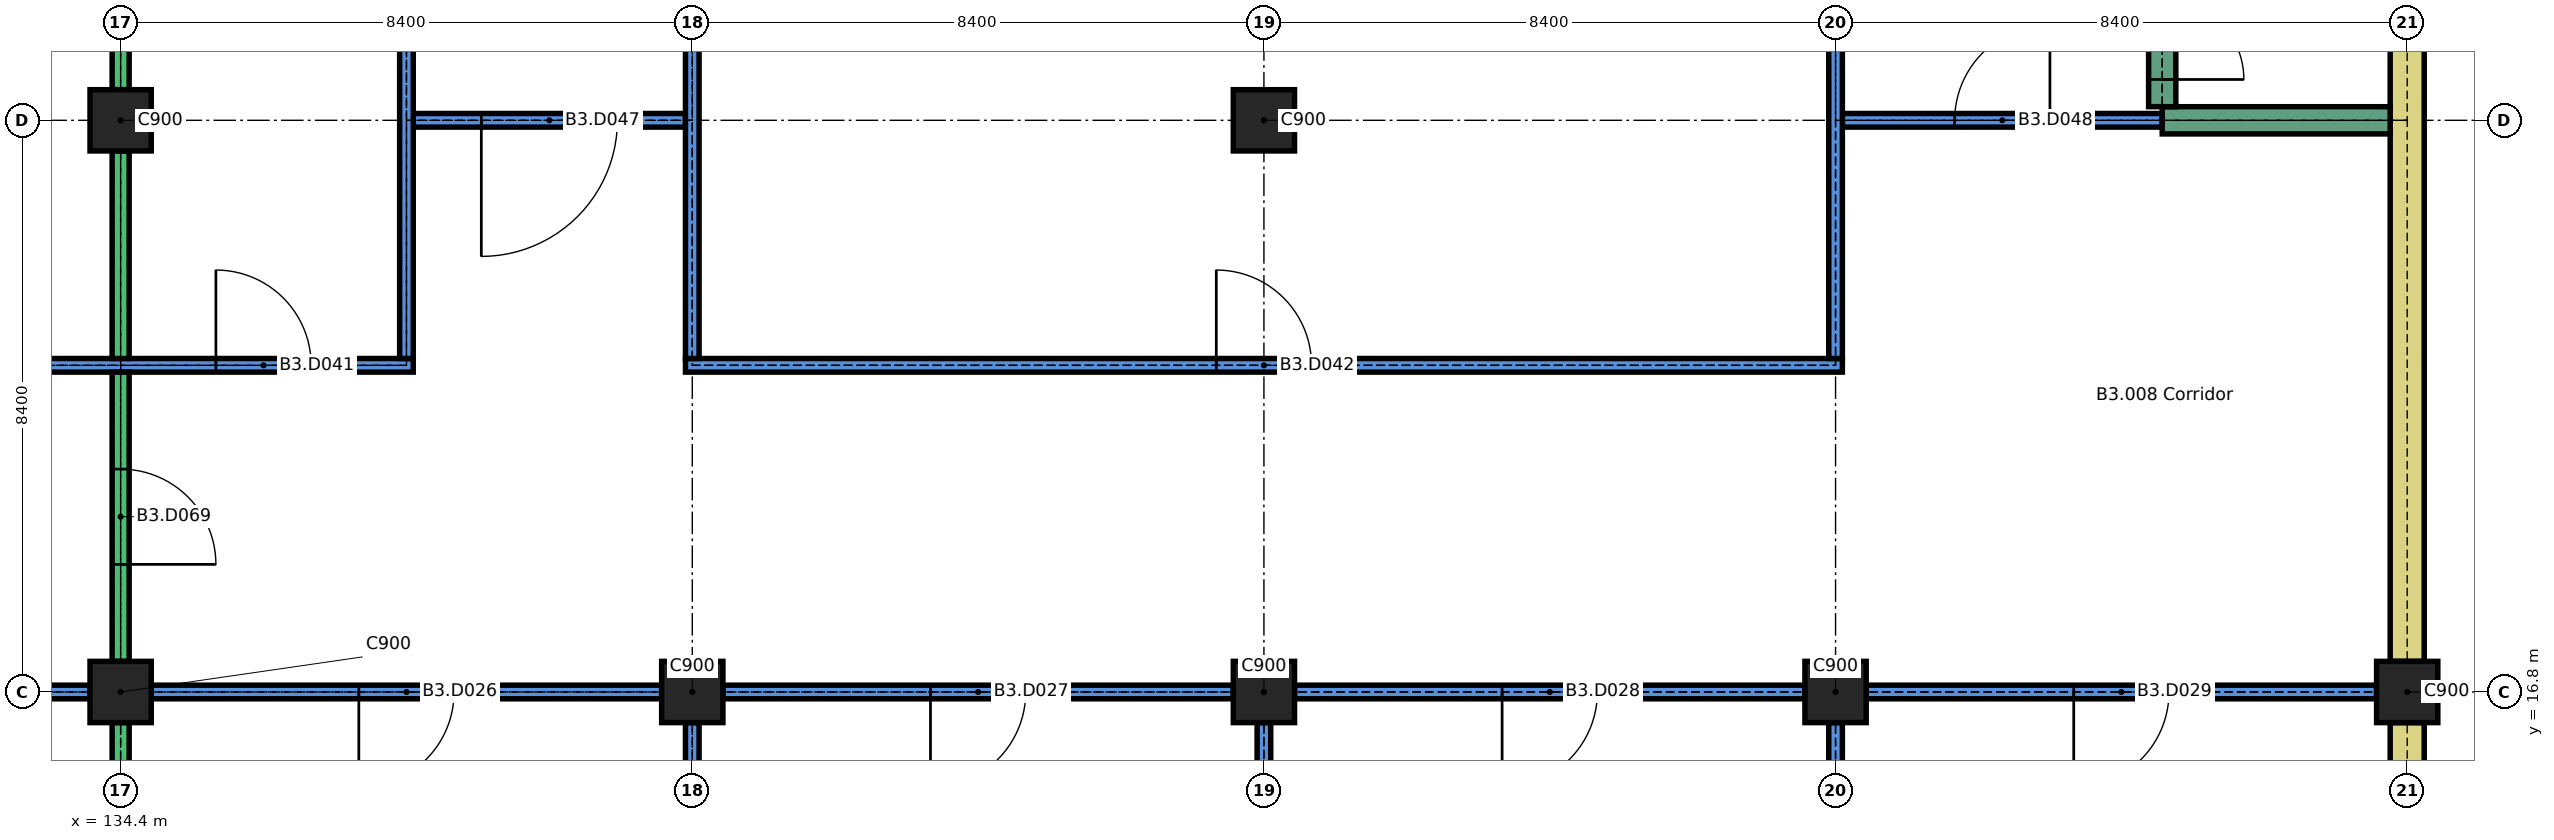
"""IFC4 building model, lengths in metres.
Left out: names, types, materials, properties, quantities, classifications, styles, units other than length and angle.
Written with IfcOpenShell. Run it as: python <this file> out.ifc"""

import sys

from ifc_helpers import new_model, si_unit, direction, frame, frame_2d, origin, origin_2d, place, context, subcontext, project, spatial, rectangle, extrude, element, fill, save


model = new_model("IFC4")
c1 = context("Model", 3, precision=1e-05, world=origin(), true_north=direction((0.0, 1.0)))
c2 = subcontext(c1, "Body", "Model", "MODEL_VIEW")
j1 = project(units=[si_unit("LENGTHUNIT", "METRE"), si_unit("PLANEANGLEUNIT", "RADIAN")], contexts=[c1])
p1 = place(None, origin())
s1 = spatial("IfcSite", under=j1, at=p1, CompositionType="ELEMENT")
p2 = place(p1, origin())
s2 = spatial("IfcBuilding", under=s1, at=p2, CompositionType="ELEMENT")
p3 = place(p2, frame((0.0, 0.0, -11.4)))
s3 = spatial("IfcBuildingStorey", under=s2, at=p3, CompositionType="ELEMENT", Elevation=-11.4)
for number, where, z_axis, x_axis in (
    (1, (134.4, 16.8, 0.0), (0.0, 0.0, 1.0), (1.0, 0.0, 0.0)),
    (2, (142.8, 16.8, 0.0), (0.0, 0.0, 1.0), (1.0, 0.0, 0.0)),
    (3, (151.2, 16.8, 0.0), (0.0, 0.0, 1.0), (1.0, 0.0, 0.0)),
    (4, (159.6, 16.8, 0.0), (0.0, 0.0, 1.0), (1.0, 0.0, 0.0)),
    (5, (168.0, 16.8, 0.0), (0.0, 0.0, 1.0), (1.0, 0.0, 0.0)),
    (6, (134.4, 25.2, 0.0), (0.0, 0.0, 1.0), (1.0, 0.0, 0.0)),
    (7, (151.2, 25.2, 0.0), (0.0, 0.0, 1.0), (1.0, 0.0, 0.0)),
):
    element("IfcColumn", number, at=place(p3, frame(where, z_axis=z_axis, x_axis=x_axis)), inside=s3, PredefinedType="COLUMN", context=c2, shape_type="SweptSolid", body=[
        extrude(rectangle(XDim=0.9, YDim=0.9, at=origin_2d()), origin(), (0.0, 0.0, 1.0), 3.2),
    ])
p4 = place(p3, frame((168.0, 8.85, 0.0), z_axis=(0.0, 0.0, 1.0), x_axis=(0.0, 1.0, 0.0)))
e8 = element("IfcWall", 8, at=p4, inside=s3, PredefinedType="SOLIDWALL", context=c2, shape_type="SweptSolid", body=[
    extrude(rectangle(XDim=7.5, YDim=0.5, at=frame_2d((3.75, 0.0))), origin(), (0.0, 0.0, 1.0), 3.2),
])
p5 = place(p3, frame((168.0, 17.25, 0.0), z_axis=(0.0, 0.0, 1.0), x_axis=(0.0, 1.0, 0.0)))
e9 = element("IfcWall", 9, at=p5, inside=s3, PredefinedType="SOLIDWALL", context=c2, shape_type="SweptSolid", body=[
    extrude(rectangle(XDim=16.6, YDim=0.5, at=frame_2d((8.3, 0.0))), origin(), (0.0, 0.0, 1.0), 3.2),
])
p6 = place(p3, frame((109.65, 16.8, 0.0), z_axis=(0.0, 0.0, 1.0), x_axis=(1.0, 0.0, 0.0)))
e10 = element("IfcWall", 10, at=p6, inside=s3, PredefinedType="PARTITIONING", context=c2, shape_type="SweptSolid", body=[
    extrude(rectangle(XDim=24.3, YDim=0.2, at=frame_2d((12.15, 0.0))), origin(), (0.0, 0.0, 1.0), 3.2),
])
p7 = place(p6, frame((3.275, 0.0, 0.0)))
e11 = element("IfcOpeningElement", 11, at=p7, cuts=e10, PredefinedType="OPENING", context=c2, shape_type="SweptSolid", body=[
    extrude(rectangle(XDim=1.4, YDim=2.1, at=frame_2d((0.7, 1.05))), frame((0.0, 0.11, 0.0), z_axis=(0.0, -1.0, 0.0), x_axis=(1.0, 0.0, 0.0)), (0.0, 0.0, 1.0), 0.22),
])
p8 = place(p6, frame((19.625, 0.0, 0.0)))
e12 = element("IfcOpeningElement", 12, at=p8, cuts=e10, PredefinedType="OPENING", context=c2, shape_type="SweptSolid", body=[
    extrude(rectangle(XDim=1.4, YDim=2.1, at=frame_2d((0.7, 1.05))), frame((0.0, 0.11, 0.0), z_axis=(0.0, -1.0, 0.0), x_axis=(1.0, 0.0, 0.0)), (0.0, 0.0, 1.0), 0.22),
])
p9 = place(p3, frame((134.85, 16.8, 0.0), z_axis=(0.0, 0.0, 1.0), x_axis=(1.0, 0.0, 0.0)))
e13 = element("IfcWall", 13, at=p9, inside=s3, PredefinedType="PARTITIONING", context=c2, shape_type="SweptSolid", body=[
    extrude(rectangle(XDim=7.5, YDim=0.2, at=frame_2d((3.75, 0.0))), origin(), (0.0, 0.0, 1.0), 3.2),
])
p10 = place(p9, frame((3.05, 0.0, 0.0)))
e14 = element("IfcOpeningElement", 14, at=p10, cuts=e13, PredefinedType="OPENING", context=c2, shape_type="SweptSolid", body=[
    extrude(rectangle(XDim=1.4, YDim=2.1, at=frame_2d((0.7, 1.05))), frame((0.0, 0.11, 0.0), z_axis=(0.0, -1.0, 0.0), x_axis=(1.0, 0.0, 0.0)), (0.0, 0.0, 1.0), 0.22),
])
p11 = place(p3, frame((143.25, 16.8, 0.0), z_axis=(0.0, 0.0, 1.0), x_axis=(1.0, 0.0, 0.0)))
e15 = element("IfcWall", 15, at=p11, inside=s3, PredefinedType="PARTITIONING", context=c2, shape_type="SweptSolid", body=[
    extrude(rectangle(XDim=7.5, YDim=0.2, at=frame_2d((3.75, 0.0))), origin(), (0.0, 0.0, 1.0), 3.2),
])
p12 = place(p11, frame((3.05, 0.0, 0.0)))
e16 = element("IfcOpeningElement", 16, at=p12, cuts=e15, PredefinedType="OPENING", context=c2, shape_type="SweptSolid", body=[
    extrude(rectangle(XDim=1.4, YDim=2.1, at=frame_2d((0.7, 1.05))), frame((0.0, 0.11, 0.0), z_axis=(0.0, -1.0, 0.0), x_axis=(1.0, 0.0, 0.0)), (0.0, 0.0, 1.0), 0.22),
])
p13 = place(p3, frame((151.65, 16.8, 0.0), z_axis=(0.0, 0.0, 1.0), x_axis=(1.0, 0.0, 0.0)))
e17 = element("IfcWall", 17, at=p13, inside=s3, PredefinedType="PARTITIONING", context=c2, shape_type="SweptSolid", body=[
    extrude(rectangle(XDim=7.5, YDim=0.2, at=frame_2d((3.75, 0.0))), origin(), (0.0, 0.0, 1.0), 3.2),
])
p14 = place(p13, frame((3.05, 0.0, 0.0)))
e18 = element("IfcOpeningElement", 18, at=p14, cuts=e17, PredefinedType="OPENING", context=c2, shape_type="SweptSolid", body=[
    extrude(rectangle(XDim=1.4, YDim=2.1, at=frame_2d((0.7, 1.05))), frame((0.0, 0.11, 0.0), z_axis=(0.0, -1.0, 0.0), x_axis=(1.0, 0.0, 0.0)), (0.0, 0.0, 1.0), 0.22),
])
p15 = place(p3, frame((160.05, 16.8, 0.0), z_axis=(0.0, 0.0, 1.0), x_axis=(1.0, 0.0, 0.0)))
e19 = element("IfcWall", 19, at=p15, inside=s3, PredefinedType="PARTITIONING", context=c2, shape_type="SweptSolid", body=[
    extrude(rectangle(XDim=7.5, YDim=0.2, at=frame_2d((3.75, 0.0))), origin(), (0.0, 0.0, 1.0), 3.2),
])
p16 = place(p15, frame((3.05, 0.0, 0.0)))
e20 = element("IfcOpeningElement", 20, at=p16, cuts=e19, PredefinedType="OPENING", context=c2, shape_type="SweptSolid", body=[
    extrude(rectangle(XDim=1.4, YDim=2.1, at=frame_2d((0.7, 1.05))), frame((0.0, 0.11, 0.0), z_axis=(0.0, -1.0, 0.0), x_axis=(1.0, 0.0, 0.0)), (0.0, 0.0, 1.0), 0.22),
])
p17 = place(p3, frame((126.0, 21.6, 0.0), z_axis=(0.0, 0.0, 1.0), x_axis=(1.0, 0.0, 0.0)))
e21 = element("IfcWall", 21, at=p17, inside=s3, PredefinedType="PARTITIONING", context=c2, shape_type="SweptSolid", body=[
    extrude(rectangle(XDim=12.7, YDim=0.2, at=frame_2d((6.35, 0.0))), origin(), (0.0, 0.0, 1.0), 3.2),
])
p18 = place(p17, frame((3.5, 0.0, 0.0)))
e22 = element("IfcOpeningElement", 22, at=p18, cuts=e21, PredefinedType="OPENING", context=c2, shape_type="SweptSolid", body=[
    extrude(rectangle(XDim=1.4, YDim=2.1, at=frame_2d((0.7, 1.05))), frame((0.0, 0.11, 0.0), z_axis=(0.0, -1.0, 0.0), x_axis=(1.0, 0.0, 0.0)), (0.0, 0.0, 1.0), 0.22),
])
p19 = place(p17, frame((9.8, 0.0, 0.0)))
e23 = element("IfcOpeningElement", 23, at=p19, cuts=e21, PredefinedType="OPENING", context=c2, shape_type="SweptSolid", body=[
    extrude(rectangle(XDim=1.4, YDim=2.1, at=frame_2d((0.7, 1.05))), frame((0.0, 0.11, 0.0), z_axis=(0.0, -1.0, 0.0), x_axis=(1.0, 0.0, 0.0)), (0.0, 0.0, 1.0), 0.22),
])
p20 = place(p3, frame((142.7, 21.6, 0.0), z_axis=(0.0, 0.0, 1.0), x_axis=(1.0, 0.0, 0.0)))
e24 = element("IfcWall", 24, at=p20, inside=s3, PredefinedType="PARTITIONING", context=c2, shape_type="SweptSolid", body=[
    extrude(rectangle(XDim=17.0, YDim=0.2, at=frame_2d((8.5, 0.0))), origin(), (0.0, 0.0, 1.0), 3.2),
])
p21 = place(p20, frame((7.8, 0.0, 0.0)))
e25 = element("IfcOpeningElement", 25, at=p21, cuts=e24, PredefinedType="OPENING", context=c2, shape_type="SweptSolid", body=[
    extrude(rectangle(XDim=1.4, YDim=2.1, at=frame_2d((0.7, 1.05))), frame((0.0, 0.11, 0.0), z_axis=(0.0, -1.0, 0.0), x_axis=(1.0, 0.0, 0.0)), (0.0, 0.0, 1.0), 0.22),
])
p22 = place(p3, frame((138.7, 25.2, 0.0), z_axis=(0.0, 0.0, 1.0), x_axis=(1.0, 0.0, 0.0)))
e26 = element("IfcWall", 26, at=p22, inside=s3, PredefinedType="PARTITIONING", context=c2, shape_type="SweptSolid", body=[
    extrude(rectangle(XDim=4.0, YDim=0.2, at=frame_2d((2.0, 0.0))), origin(), (0.0, 0.0, 1.0), 3.2),
])
p23 = place(p22, frame((1.0, 0.0, 0.0)))
e27 = element("IfcOpeningElement", 27, at=p23, cuts=e26, PredefinedType="OPENING", context=c2, shape_type="SweptSolid", body=[
    extrude(rectangle(XDim=2.0, YDim=2.4, at=frame_2d((1.0, 1.2))), frame((0.0, 0.11, 0.0), z_axis=(0.0, -1.0, 0.0), x_axis=(1.0, 0.0, 0.0)), (0.0, 0.0, 1.0), 0.22),
])
p24 = place(p3, frame((159.7, 25.2, 0.0), z_axis=(0.0, 0.0, 1.0), x_axis=(1.0, 0.0, 0.0)))
e28 = element("IfcWall", 28, at=p24, inside=s3, PredefinedType="PARTITIONING", context=c2, shape_type="SweptSolid", body=[
    extrude(rectangle(XDim=4.7, YDim=0.2, at=frame_2d((2.35, 0.0))), origin(), (0.0, 0.0, 1.0), 3.2),
])
p25 = place(p24, frame((1.65, 0.0, 0.0)))
e29 = element("IfcOpeningElement", 29, at=p25, cuts=e28, PredefinedType="OPENING", context=c2, shape_type="SweptSolid", body=[
    extrude(rectangle(XDim=1.4, YDim=2.1, at=frame_2d((0.7, 1.05))), frame((0.0, 0.11, 0.0), z_axis=(0.0, -1.0, 0.0), x_axis=(1.0, 0.0, 0.0)), (0.0, 0.0, 1.0), 0.22),
])
p26 = place(p3, frame((164.4, 25.2, 0.0), z_axis=(0.0, 0.0, 1.0), x_axis=(1.0, 0.0, 0.0)))
e30 = element("IfcWall", 30, at=p26, inside=s3, PredefinedType="SHEAR", context=c2, shape_type="SweptSolid", body=[
    extrude(rectangle(XDim=3.35, YDim=0.4, at=frame_2d((1.675, 0.0))), origin(), (0.0, 0.0, 1.0), 3.2),
])
p27 = place(p3, frame((134.4, 8.85, 0.0), z_axis=(0.0, 0.0, 1.0), x_axis=(0.0, 1.0, 0.0)))
e31 = element("IfcWall", 31, at=p27, inside=s3, PredefinedType="SOLIDWALL", context=c2, shape_type="SweptSolid", body=[
    extrude(rectangle(XDim=7.5, YDim=0.25, at=frame_2d((3.75, 0.0))), origin(), (0.0, 0.0, 1.0), 3.2),
])
p28 = place(p3, frame((134.4, 17.25, 0.0), z_axis=(0.0, 0.0, 1.0), x_axis=(0.0, 1.0, 0.0)))
e32 = element("IfcWall", 32, at=p28, inside=s3, PredefinedType="SOLIDWALL", context=c2, shape_type="SweptSolid", body=[
    extrude(rectangle(XDim=4.25, YDim=0.25, at=frame_2d((2.125, 0.0))), origin(), (0.0, 0.0, 1.0), 3.2),
])
p29 = place(p28, frame((1.425, 0.0, 0.0)))
e33 = element("IfcOpeningElement", 33, at=p29, cuts=e32, PredefinedType="OPENING", context=c2, shape_type="SweptSolid", body=[
    extrude(rectangle(XDim=1.4, YDim=2.1, at=frame_2d((0.7, 1.05))), frame((0.0, 0.135, 0.0), z_axis=(0.0, -1.0, 0.0), x_axis=(1.0, 0.0, 0.0)), (0.0, 0.0, 1.0), 0.27),
])
p30 = place(p3, frame((134.4, 21.7, 0.0), z_axis=(0.0, 0.0, 1.0), x_axis=(0.0, 1.0, 0.0)))
e34 = element("IfcWall", 34, at=p30, inside=s3, PredefinedType="SOLIDWALL", context=c2, shape_type="SweptSolid", body=[
    extrude(rectangle(XDim=3.05, YDim=0.25, at=frame_2d((1.525, 0.0))), origin(), (0.0, 0.0, 1.0), 3.2),
])
p31 = place(p3, frame((134.4, 25.65, 0.0), z_axis=(0.0, 0.0, 1.0), x_axis=(0.0, 1.0, 0.0)))
e35 = element("IfcWall", 35, at=p31, inside=s3, PredefinedType="SOLIDWALL", context=c2, shape_type="SweptSolid", body=[
    extrude(rectangle(XDim=7.5, YDim=0.25, at=frame_2d((3.75, 0.0))), origin(), (0.0, 0.0, 1.0), 3.2),
])
p32 = place(p3, frame((138.6, 21.7, 0.0), z_axis=(0.0, 0.0, 1.0), x_axis=(0.0, 1.0, 0.0)))
e36 = element("IfcWall", 36, at=p32, inside=s3, PredefinedType="PARTITIONING", context=c2, shape_type="SweptSolid", body=[
    extrude(rectangle(XDim=8.3, YDim=0.2, at=frame_2d((4.15, 0.0))), origin(), (0.0, 0.0, 1.0), 3.2),
])
p33 = place(p3, frame((142.8, 8.85, 0.0), z_axis=(0.0, 0.0, 1.0), x_axis=(0.0, 1.0, 0.0)))
e37 = element("IfcWall", 37, at=p33, inside=s3, PredefinedType="PARTITIONING", context=c2, shape_type="SweptSolid", body=[
    extrude(rectangle(XDim=7.5, YDim=0.2, at=frame_2d((3.75, 0.0))), origin(), (0.0, 0.0, 1.0), 3.2),
])
p34 = place(p3, frame((142.8, 21.7, 0.0), z_axis=(0.0, 0.0, 1.0), x_axis=(0.0, 1.0, 0.0)))
e38 = element("IfcWall", 38, at=p34, inside=s3, PredefinedType="PARTITIONING", context=c2, shape_type="SweptSolid", body=[
    extrude(rectangle(XDim=8.3, YDim=0.2, at=frame_2d((4.15, 0.0))), origin(), (0.0, 0.0, 1.0), 3.2),
])
for number, where, z_axis, x_axis in (
    (39, (151.2, 8.85, 0.0), (0.0, 0.0, 1.0), (0.0, 1.0, 0.0)),
    (40, (159.6, 8.85, 0.0), (0.0, 0.0, 1.0), (0.0, 1.0, 0.0)),
):
    element("IfcWall", number, at=place(p3, frame(where, z_axis=z_axis, x_axis=x_axis)), inside=s3, PredefinedType="PARTITIONING", context=c2, shape_type="SweptSolid", body=[
        extrude(rectangle(XDim=7.5, YDim=0.2, at=frame_2d((3.75, 0.0))), origin(), (0.0, 0.0, 1.0), 3.2),
    ])
p35 = place(p3, frame((159.6, 21.7, 0.0), z_axis=(0.0, 0.0, 1.0), x_axis=(0.0, 1.0, 0.0)))
e41 = element("IfcWall", 41, at=p35, inside=s3, PredefinedType="PARTITIONING", context=c2, shape_type="SweptSolid", body=[
    extrude(rectangle(XDim=11.65, YDim=0.2, at=frame_2d((5.825, 0.0))), origin(), (0.0, 0.0, 1.0), 3.2),
])
p36 = place(p3, frame((164.4, 25.4, 0.0), z_axis=(0.0, 0.0, 1.0), x_axis=(0.0, 1.0, 0.0)))
e42 = element("IfcWall", 42, at=p36, inside=s3, PredefinedType="SHEAR", context=c2, shape_type="SweptSolid", body=[
    extrude(rectangle(XDim=7.95, YDim=0.4, at=frame_2d((3.975, 0.0))), origin(), (0.0, 0.0, 1.0), 3.2),
])
p37 = place(p36, frame((0.4, 0.0, 0.0)))
e43 = element("IfcOpeningElement", 43, at=p37, cuts=e42, PredefinedType="OPENING", context=c2, shape_type="SweptSolid", body=[
    extrude(rectangle(XDim=1.2, YDim=2.1, at=frame_2d((0.6, 1.05))), frame((0.0, 0.21, 0.0), z_axis=(0.0, -1.0, 0.0), x_axis=(1.0, 0.0, 0.0)), (0.0, 0.0, 1.0), 0.42),
])
p38 = place(p10, origin())
e44 = element("IfcDoor", 44, at=p38, inside=s3, OperationType="SINGLE_SWING_LEFT", PredefinedType="DOOR", context=c2, shape_type="SweptSolid", body=[
    extrude(rectangle(XDim=1.4, YDim=2.1, at=frame_2d((0.7, 1.05))), frame((0.0, 0.025, 0.0), z_axis=(0.0, -1.0, 0.0), x_axis=(1.0, 0.0, 0.0)), (0.0, 0.0, 1.0), 0.05),
])
fill(e14, e44)
p39 = place(p12, origin())
e45 = element("IfcDoor", 45, at=p39, inside=s3, OperationType="SINGLE_SWING_LEFT", PredefinedType="DOOR", context=c2, shape_type="SweptSolid", body=[
    extrude(rectangle(XDim=1.4, YDim=2.1, at=frame_2d((0.7, 1.05))), frame((0.0, 0.025, 0.0), z_axis=(0.0, -1.0, 0.0), x_axis=(1.0, 0.0, 0.0)), (0.0, 0.0, 1.0), 0.05),
])
fill(e16, e45)
p40 = place(p14, origin())
e46 = element("IfcDoor", 46, at=p40, inside=s3, OperationType="SINGLE_SWING_LEFT", PredefinedType="DOOR", context=c2, shape_type="SweptSolid", body=[
    extrude(rectangle(XDim=1.4, YDim=2.1, at=frame_2d((0.7, 1.05))), frame((0.0, 0.025, 0.0), z_axis=(0.0, -1.0, 0.0), x_axis=(1.0, 0.0, 0.0)), (0.0, 0.0, 1.0), 0.05),
])
fill(e18, e46)
p41 = place(p16, origin())
e47 = element("IfcDoor", 47, at=p41, inside=s3, OperationType="SINGLE_SWING_LEFT", PredefinedType="DOOR", context=c2, shape_type="SweptSolid", body=[
    extrude(rectangle(XDim=1.4, YDim=2.1, at=frame_2d((0.7, 1.05))), frame((0.0, 0.025, 0.0), z_axis=(0.0, -1.0, 0.0), x_axis=(1.0, 0.0, 0.0)), (0.0, 0.0, 1.0), 0.05),
])
fill(e20, e47)
p42 = place(p19, origin())
e48 = element("IfcDoor", 48, at=p42, inside=s3, OperationType="SINGLE_SWING_RIGHT", PredefinedType="DOOR", context=c2, shape_type="SweptSolid", body=[
    extrude(rectangle(XDim=1.4, YDim=2.1, at=frame_2d((0.7, 1.05))), frame((0.0, 0.025, 0.0), z_axis=(0.0, -1.0, 0.0), x_axis=(1.0, 0.0, 0.0)), (0.0, 0.0, 1.0), 0.05),
])
fill(e23, e48)
p43 = place(p21, origin())
e49 = element("IfcDoor", 49, at=p43, inside=s3, OperationType="SINGLE_SWING_RIGHT", PredefinedType="DOOR", context=c2, shape_type="SweptSolid", body=[
    extrude(rectangle(XDim=1.4, YDim=2.1, at=frame_2d((0.7, 1.05))), frame((0.0, 0.025, 0.0), z_axis=(0.0, -1.0, 0.0), x_axis=(1.0, 0.0, 0.0)), (0.0, 0.0, 1.0), 0.05),
])
fill(e25, e49)
p44 = place(p23, origin())
e50 = element("IfcDoor", 50, at=p44, inside=s3, OperationType="SINGLE_SWING_LEFT", PredefinedType="DOOR", context=c2, shape_type="SweptSolid", body=[
    extrude(rectangle(XDim=2.0, YDim=2.4, at=frame_2d((1.0, 1.2))), frame((0.0, 0.03, 0.0), z_axis=(0.0, -1.0, 0.0), x_axis=(1.0, 0.0, 0.0)), (0.0, 0.0, 1.0), 0.06),
])
fill(e27, e50)
p45 = place(p25, origin())
e51 = element("IfcDoor", 51, at=p45, inside=s3, OperationType="SINGLE_SWING_LEFT", PredefinedType="DOOR", context=c2, shape_type="SweptSolid", body=[
    extrude(rectangle(XDim=1.4, YDim=2.1, at=frame_2d((0.7, 1.05))), frame((0.0, 0.03, 0.0), z_axis=(0.0, -1.0, 0.0), x_axis=(1.0, 0.0, 0.0)), (0.0, 0.0, 1.0), 0.06),
])
fill(e29, e51)
p46 = place(p29, origin())
e52 = element("IfcDoor", 52, at=p46, inside=s3, OperationType="SINGLE_SWING_LEFT", PredefinedType="DOOR", context=c2, shape_type="SweptSolid", body=[
    extrude(rectangle(XDim=1.4, YDim=2.1, at=frame_2d((0.7, 1.05))), frame((0.0, 0.03, 0.0), z_axis=(0.0, -1.0, 0.0), x_axis=(1.0, 0.0, 0.0)), (0.0, 0.0, 1.0), 0.06),
])
fill(e33, e52)
p47 = place(p37, origin())
e53 = element("IfcDoor", 53, at=p47, inside=s3, OperationType="SINGLE_SWING_LEFT", PredefinedType="DOOR", context=c2, shape_type="SweptSolid", body=[
    extrude(rectangle(XDim=1.2, YDim=2.1, at=frame_2d((0.6, 1.05))), frame((0.0, 0.025, 0.0), z_axis=(0.0, -1.0, 0.0), x_axis=(1.0, 0.0, 0.0)), (0.0, 0.0, 1.0), 0.05),
])
fill(e43, e53)
save(model, sys.argv[1])
